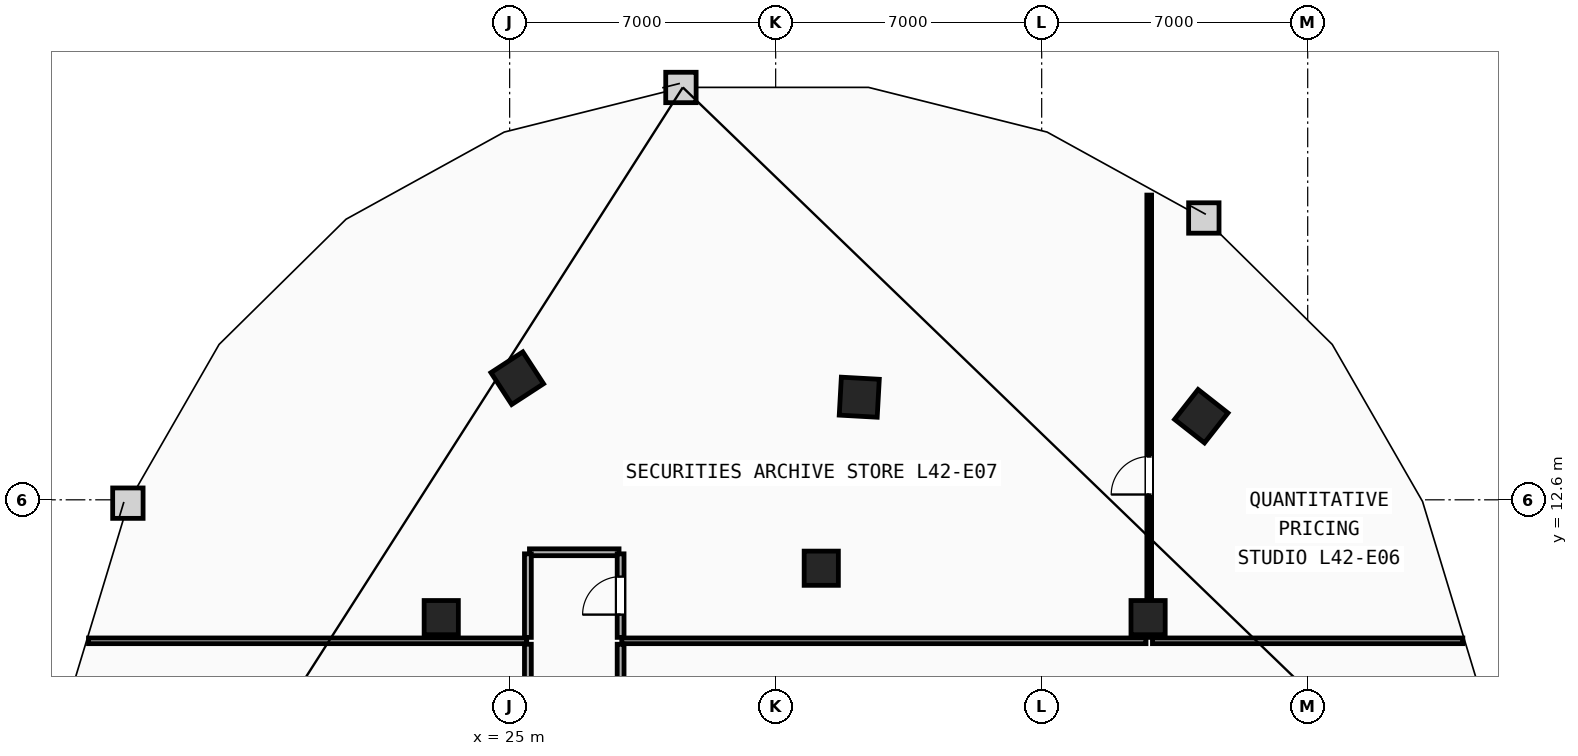
"""IFC4 building model, lengths in metres.
Left out: names, types, materials, properties, quantities, classifications, styles, units other than length and angle.
Written with IfcOpenShell. Run it as: python <this file> out.ifc"""

import sys

from ifc_helpers import new_model, si_unit, direction, frame, frame_2d, origin, origin_2d, place, context, subcontext, project, spatial, rectangle, extrude, element, fill, save


model = new_model("IFC4")
c1 = context("Model", 3, precision=1e-05, world=origin(), true_north=direction((0.0, 1.0)))
c2 = subcontext(c1, "Body", "Model", "MODEL_VIEW")
j1 = project(units=[si_unit("LENGTHUNIT", "METRE"), si_unit("PLANEANGLEUNIT", "RADIAN")], contexts=[c1])
p1 = place(None, origin())
s1 = spatial("IfcSite", under=j1, at=p1, CompositionType="ELEMENT")
p2 = place(p1, origin())
s2 = spatial("IfcBuilding", under=s1, at=p2, CompositionType="ELEMENT")
p3 = place(p2, frame((0.0, 0.0, 162.0)))
s3 = spatial("IfcBuildingStorey", under=s2, at=p3, CompositionType="ELEMENT", Elevation=162.0)
for number, where, z_axis, x_axis in (
    (1, (41.8, 9.5, 0.0), (0.0, 0.0, 1.0), (1.0, 0.0, 0.0)),
    (2, (33.2, 10.8, 0.0), (0.0, 0.0, 1.0), (1.0, 0.0, 0.0)),
    (3, (23.2, 9.5, 0.0), (0.0, 0.0, 1.0), (1.0, 0.0, 0.0)),
):
    element("IfcColumn", number, at=place(p3, frame(where, z_axis=z_axis, x_axis=x_axis)), inside=s3, PredefinedType="COLUMN", context=c2, shape_type="SweptSolid", body=[
        extrude(rectangle(XDim=0.9, YDim=0.9, at=origin_2d()), origin(), (0.0, 0.0, 1.0), 3.6),
    ])
for number, where, z_axis, x_axis in (
    (4, (43.2, 14.8, 0.0), (0.0, 0.0, 1.0), (-0.786, 0.618, 0.0)),
    (5, (34.2, 15.3, 0.0), (0.0, 0.0, 1.0), (-0.998, 0.055, 0.0)),
    (6, (25.2, 15.8, 0.0), (0.0, 0.0, 1.0), (-0.838, -0.546, 0.0)),
):
    element("IfcColumn", number, at=place(p3, frame(where, z_axis=z_axis, x_axis=x_axis)), inside=s3, PredefinedType="COLUMN", context=c2, shape_type="SweptSolid", body=[
        extrude(rectangle(XDim=1.0, YDim=1.0, at=origin_2d()), origin(), (0.0, 0.0, 1.0), 3.6),
    ])
p4 = place(p3, frame((13.918, 8.89, 0.0), z_axis=(0.0, 0.0, 1.0), x_axis=(1.0, 0.0, 0.0)))
e7 = element("IfcWall", 7, at=p4, inside=s3, PredefinedType="PARTITIONING", context=c2, shape_type="SweptSolid", body=[
    extrude(rectangle(XDim=11.532, YDim=0.15, at=frame_2d((5.766, 0.0))), origin(), (0.0, 0.0, 1.0), 3.36),
])
p5 = place(p3, frame((27.95, 8.89, 0.0), z_axis=(0.0, 0.0, 1.0), x_axis=(1.0, 0.0, 0.0)))
e8 = element("IfcWall", 8, at=p5, inside=s3, PredefinedType="PARTITIONING", context=c2, shape_type="SweptSolid", body=[
    extrude(rectangle(XDim=13.795, YDim=0.15, at=frame_2d((6.897, 0.0))), origin(), (0.0, 0.0, 1.0), 3.36),
])
p6 = place(p3, frame((41.915, 8.89, 0.0), z_axis=(0.0, 0.0, 1.0), x_axis=(1.0, 0.0, 0.0)))
e9 = element("IfcWall", 9, at=p6, inside=s3, PredefinedType="PARTITIONING", context=c2, shape_type="SweptSolid", body=[
    extrude(rectangle(XDim=8.167, YDim=0.15, at=frame_2d((4.083, 0.0))), origin(), (0.0, 0.0, 1.0), 3.36),
])
p7 = place(p3, frame((25.48, 8.8, 0.0), z_axis=(0.0, 0.0, 1.0), x_axis=(0.0, -1.0, 0.0)))
e10 = element("IfcWall", 10, at=p7, inside=s3, PredefinedType="PARTITIONING", context=c2, shape_type="SweptSolid", body=[
    extrude(rectangle(XDim=8.35, YDim=0.18, at=frame_2d((4.175, 0.0))), origin(), (0.0, 0.0, 1.0), 3.36),
])
p8 = place(p3, frame((27.92, 0.45, 0.0), z_axis=(0.0, 0.0, 1.0), x_axis=(0.0, 1.0, 0.0)))
e11 = element("IfcWall", 11, at=p8, inside=s3, PredefinedType="PARTITIONING", context=c2, shape_type="SweptSolid", body=[
    extrude(rectangle(XDim=8.35, YDim=0.18, at=frame_2d((4.175, 0.0))), origin(), (0.0, 0.0, 1.0), 3.36),
])
p9 = place(p8, frame((3.675, 0.0, 0.0)))
e12 = element("IfcOpeningElement", 12, at=p9, cuts=e11, PredefinedType="OPENING", context=c2, shape_type="SweptSolid", body=[
    extrude(rectangle(XDim=1.0, YDim=2.15, at=frame_2d((0.5, 1.075))), frame((0.0, 0.1, 0.0), z_axis=(0.0, -1.0, 0.0), x_axis=(1.0, 0.0, 0.0)), (0.0, 0.0, 1.0), 0.2),
])
p10 = place(p3, frame((27.878, 11.22, 0.0), z_axis=(0.0, 0.0, 1.0), x_axis=(-1.0, 0.0, 0.0)))
e13 = element("IfcWall", 13, at=p10, inside=s3, PredefinedType="PARTITIONING", context=c2, shape_type="SweptSolid", body=[
    extrude(rectangle(XDim=2.357, YDim=0.18, at=frame_2d((1.178, 0.0))), origin(), (0.0, 0.0, 1.0), 3.36),
])
p11 = place(p3, frame((25.48, 11.178, 0.0), z_axis=(0.0, 0.0, 1.0), x_axis=(0.0, -1.0, 0.0)))
e14 = element("IfcWall", 14, at=p11, inside=s3, PredefinedType="PARTITIONING", context=c2, shape_type="SweptSolid", body=[
    extrude(rectangle(XDim=2.198, YDim=0.18, at=frame_2d((1.099, 0.0))), origin(), (0.0, 0.0, 1.0), 3.36),
])
p12 = place(p3, frame((27.92, 8.98, 0.0), z_axis=(0.0, 0.0, 1.0), x_axis=(0.0, 1.0, 0.0)))
e15 = element("IfcWall", 15, at=p12, inside=s3, PredefinedType="PARTITIONING", context=c2, shape_type="SweptSolid", body=[
    extrude(rectangle(XDim=2.198, YDim=0.18, at=frame_2d((1.099, 0.0))), origin(), (0.0, 0.0, 1.0), 3.36),
])
p13 = place(p12, frame((0.599, 0.0, 0.0)))
e16 = element("IfcOpeningElement", 16, at=p13, cuts=e15, PredefinedType="OPENING", context=c2, shape_type="SweptSolid", body=[
    extrude(rectangle(XDim=1.0, YDim=2.15, at=frame_2d((0.5, 1.075))), frame((0.0, 0.1, 0.0), z_axis=(0.0, -1.0, 0.0), x_axis=(1.0, 0.0, 0.0)), (0.0, 0.0, 1.0), 0.2),
])
p14 = place(p3, frame((41.83, 8.98, 0.0), z_axis=(0.0, 0.0, 1.0), x_axis=(0.0, 1.0, 0.0)))
e17 = element("IfcWall", 17, at=p14, inside=s3, PredefinedType="PARTITIONING", context=c2, shape_type="SweptSolid", body=[
    extrude(rectangle(XDim=11.638, YDim=0.125, at=frame_2d((5.819, 0.0))), origin(), (0.0, 0.0, 1.0), 2.897),
])
p15 = place(p14, frame((3.76, 0.0, 0.0)))
e18 = element("IfcOpeningElement", 18, at=p15, cuts=e17, PredefinedType="OPENING", context=c2, shape_type="SweptSolid", body=[
    extrude(rectangle(XDim=1.0, YDim=2.15, at=frame_2d((0.5, 1.075))), frame((0.0, 0.073, 0.0), z_axis=(0.0, -1.0, 0.0), x_axis=(1.0, 0.0, 0.0)), (0.0, 0.0, 1.0), 0.145),
])
p16 = place(p15, origin())
e19 = element("IfcDoor", 19, at=p16, inside=s3, OperationType="SINGLE_SWING_LEFT", PredefinedType="DOOR", context=c2, shape_type="SweptSolid", body=[
    extrude(rectangle(XDim=1.0, YDim=2.15, at=frame_2d((0.5, 1.075))), frame((0.0, 0.025, 0.0), z_axis=(0.0, -1.0, 0.0), x_axis=(1.0, 0.0, 0.0)), (0.0, 0.0, 1.0), 0.05),
])
fill(e18, e19)
p17 = place(p13, origin())
e20 = element("IfcDoor", 20, at=p17, inside=s3, OperationType="SINGLE_SWING_LEFT", PredefinedType="DOOR", context=c2, shape_type="SweptSolid", body=[
    extrude(rectangle(XDim=1.0, YDim=2.15, at=frame_2d((0.5, 1.075))), frame((0.0, 0.025, 0.0), z_axis=(0.0, -1.0, 0.0), x_axis=(1.0, 0.0, 0.0)), (0.0, 0.0, 1.0), 0.05),
])
fill(e16, e20)
save(model, sys.argv[1])
